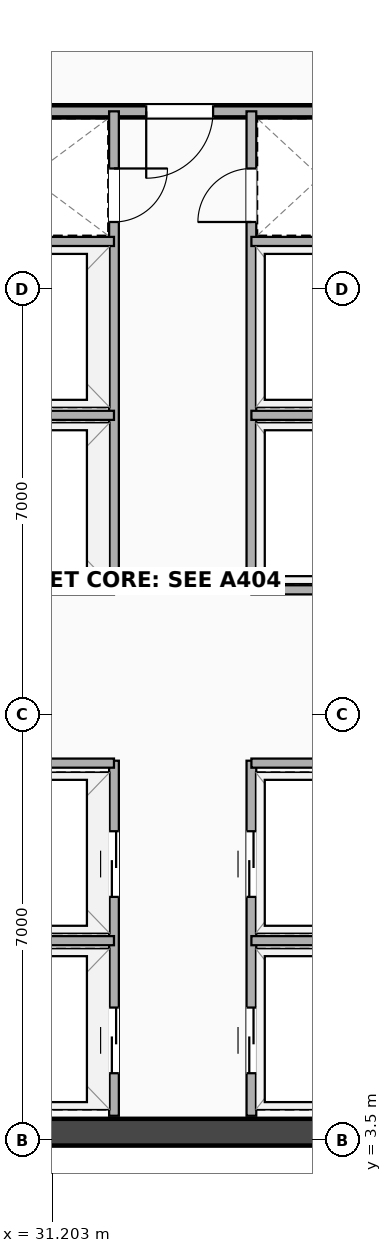
"""IFC4 building model, lengths in metres.
Left out: names, types, materials, properties, quantities, classifications, styles, units other than length and angle.
Written with IfcOpenShell. Run it as: python <this file> out.ifc"""

import sys

from ifc_helpers import new_model, si_unit, direction, frame, frame_2d, origin, place, context, subcontext, project, spatial, rectangle, extrude, element, fill, save


model = new_model("IFC4")
c1 = context("Model", 3, precision=1e-05, world=origin(), true_north=direction((0.0, 1.0)))
c2 = subcontext(c1, "Body", "Model", "MODEL_VIEW")
j1 = project(units=[si_unit("LENGTHUNIT", "METRE"), si_unit("PLANEANGLEUNIT", "RADIAN")], contexts=[c1])
p1 = place(None, origin())
s1 = spatial("IfcSite", under=j1, at=p1, CompositionType="ELEMENT")
p2 = place(p1, origin())
s2 = spatial("IfcBuilding", under=s1, at=p2, CompositionType="ELEMENT")
p3 = place(p2, frame((0.0, 0.0, 50.9)))
s3 = spatial("IfcBuildingStorey", under=s2, at=p3, CompositionType="ELEMENT", Elevation=50.9)
p4 = place(p3, frame((20.3, 3.63, 0.0), z_axis=(0.0, 0.0, 1.0), x_axis=(1.0, 0.0, 0.0)))
e1 = element("IfcWall", 1, at=p4, inside=s3, PredefinedType="SHEAR", context=c2, shape_type="SweptSolid", body=[
    extrude(rectangle(XDim=24.5, YDim=0.44, at=frame_2d((12.25, 0.0))), origin(), (0.0, 0.0, 1.0), 3.22),
])
p5 = place(p3, frame((29.2, 20.42, 0.0), z_axis=(0.0, 0.0, 1.0), x_axis=(1.0, 0.0, 0.0)))
e2 = element("IfcWall", 2, at=p5, inside=s3, PredefinedType="PARTITIONING", context=c2, shape_type="SweptSolid", body=[
    extrude(rectangle(XDim=7.8, YDim=0.2, at=frame_2d((3.9, 0.0))), origin(), (0.0, 0.0, 1.0), 2.51),
])
p6 = place(p5, frame((3.55, 0.0, 0.0)))
e3 = element("IfcOpeningElement", 3, at=p6, cuts=e2, PredefinedType="OPENING", context=c2, shape_type="SweptSolid", body=[
    extrude(rectangle(XDim=1.1, YDim=2.15, at=frame_2d((0.55, 1.075))), frame((0.0, 0.11, 0.0), z_axis=(0.0, -1.0, 0.0), x_axis=(1.0, 0.0, 0.0)), (0.0, 0.0, 1.0), 0.22),
])
p7 = place(p3, frame((32.22, 3.9, 0.0), z_axis=(0.0, 0.0, 1.0), x_axis=(0.0, 1.0, 0.0)))
e4 = element("IfcWall", 4, at=p7, inside=s3, PredefinedType="PARTITIONING", context=c2, shape_type="SweptSolid", body=[
    extrude(rectangle(XDim=5.84, YDim=0.16, at=frame_2d((2.92, 0.0))), origin(), (0.0, 0.0, 1.0), 3.22),
])
p8 = place(p7, frame((1.78, 0.0, 0.0), z_axis=(0.0, 0.0, 1.0), x_axis=(-1.0, 0.0, 0.0)))
e5 = element("IfcOpeningElement", 5, at=p8, cuts=e4, PredefinedType="OPENING", context=c2, shape_type="SweptSolid", body=[
    extrude(rectangle(XDim=1.08, YDim=2.16, at=frame_2d((0.54, 1.08))), frame((0.0, 0.09, 0.0), z_axis=(0.0, -1.0, 0.0), x_axis=(1.0, 0.0, 0.0)), (0.0, 0.0, 1.0), 0.18),
])
p9 = place(p7, frame((4.68, 0.0, 0.0), z_axis=(0.0, 0.0, 1.0), x_axis=(-1.0, 0.0, 0.0)))
e6 = element("IfcOpeningElement", 6, at=p9, cuts=e4, PredefinedType="OPENING", context=c2, shape_type="SweptSolid", body=[
    extrude(rectangle(XDim=1.08, YDim=2.16, at=frame_2d((0.54, 1.08))), frame((0.0, 0.09, 0.0), z_axis=(0.0, -1.0, 0.0), x_axis=(1.0, 0.0, 0.0)), (0.0, 0.0, 1.0), 0.18),
])
p10 = place(p3, frame((34.48, 3.9, 0.0), z_axis=(0.0, 0.0, 1.0), x_axis=(0.0, 1.0, 0.0)))
e7 = element("IfcWall", 7, at=p10, inside=s3, PredefinedType="PARTITIONING", context=c2, shape_type="SweptSolid", body=[
    extrude(rectangle(XDim=5.84, YDim=0.16, at=frame_2d((2.92, 0.0))), origin(), (0.0, 0.0, 1.0), 3.22),
])
p11 = place(p10, frame((0.7, 0.0, 0.0)))
e8 = element("IfcOpeningElement", 8, at=p11, cuts=e7, PredefinedType="OPENING", context=c2, shape_type="SweptSolid", body=[
    extrude(rectangle(XDim=1.08, YDim=2.16, at=frame_2d((0.54, 1.08))), frame((0.0, 0.09, 0.0), z_axis=(0.0, -1.0, 0.0), x_axis=(1.0, 0.0, 0.0)), (0.0, 0.0, 1.0), 0.18),
])
p12 = place(p10, frame((3.6, 0.0, 0.0)))
e9 = element("IfcOpeningElement", 9, at=p12, cuts=e7, PredefinedType="OPENING", context=c2, shape_type="SweptSolid", body=[
    extrude(rectangle(XDim=1.08, YDim=2.16, at=frame_2d((0.54, 1.08))), frame((0.0, 0.09, 0.0), z_axis=(0.0, -1.0, 0.0), x_axis=(1.0, 0.0, 0.0)), (0.0, 0.0, 1.0), 0.18),
])
p13 = place(p3, frame((29.45, 6.78, 0.0), z_axis=(0.0, 0.0, 1.0), x_axis=(1.0, 0.0, 0.0)))
e10 = element("IfcWall", 10, at=p13, inside=s3, PredefinedType="PARTITIONING", context=c2, shape_type="SweptSolid", body=[
    extrude(rectangle(XDim=2.77, YDim=0.15, at=frame_2d((1.385, 0.0))), origin(), (0.0, 0.0, 1.0), 3.22),
])
p14 = place(p3, frame((34.48, 6.78, 0.0), z_axis=(0.0, 0.0, 1.0), x_axis=(1.0, 0.0, 0.0)))
e11 = element("IfcWall", 11, at=p14, inside=s3, PredefinedType="PARTITIONING", context=c2, shape_type="SweptSolid", body=[
    extrude(rectangle(XDim=2.27, YDim=0.15, at=frame_2d((1.135, 0.0))), origin(), (0.0, 0.0, 1.0), 3.22),
])
p15 = place(p3, frame((29.45, 9.7, 0.0), z_axis=(0.0, 0.0, 1.0), x_axis=(1.0, 0.0, 0.0)))
e12 = element("IfcWall", 12, at=p15, inside=s3, PredefinedType="PARTITIONING", context=c2, shape_type="SweptSolid", body=[
    extrude(rectangle(XDim=2.77, YDim=0.15, at=frame_2d((1.385, 0.0))), origin(), (0.0, 0.0, 1.0), 3.22),
])
p16 = place(p3, frame((34.48, 9.7, 0.0), z_axis=(0.0, 0.0, 1.0), x_axis=(1.0, 0.0, 0.0)))
e13 = element("IfcWall", 13, at=p16, inside=s3, PredefinedType="PARTITIONING", context=c2, shape_type="SweptSolid", body=[
    extrude(rectangle(XDim=2.27, YDim=0.15, at=frame_2d((1.135, 0.0))), origin(), (0.0, 0.0, 1.0), 3.22),
])
p17 = place(p3, frame((32.22, 12.5, 0.0), z_axis=(0.0, 0.0, 1.0), x_axis=(0.0, 1.0, 0.0)))
e14 = element("IfcWall", 14, at=p17, inside=s3, PredefinedType="PARTITIONING", context=c2, shape_type="SweptSolid", body=[
    extrude(rectangle(XDim=7.92, YDim=0.16, at=frame_2d((3.96, 0.0))), origin(), (0.0, 0.0, 1.0), 2.51),
])
p18 = place(p17, frame((6.1, 0.0, 0.0)))
e15 = element("IfcOpeningElement", 15, at=p18, cuts=e14, PredefinedType="OPENING", context=c2, shape_type="SweptSolid", body=[
    extrude(rectangle(XDim=0.88, YDim=2.08, at=frame_2d((0.44, 1.04))), frame((0.0, 0.09, 0.0), z_axis=(0.0, -1.0, 0.0), x_axis=(1.0, 0.0, 0.0)), (0.0, 0.0, 1.0), 0.18),
])
p19 = place(p3, frame((34.48, 12.5, 0.0), z_axis=(0.0, 0.0, 1.0), x_axis=(0.0, 1.0, 0.0)))
e16 = element("IfcWall", 16, at=p19, inside=s3, PredefinedType="PARTITIONING", context=c2, shape_type="SweptSolid", body=[
    extrude(rectangle(XDim=7.92, YDim=0.16, at=frame_2d((3.96, 0.0))), origin(), (0.0, 0.0, 1.0), 2.51),
])
p20 = place(p19, frame((6.98, 0.0, 0.0), z_axis=(0.0, 0.0, 1.0), x_axis=(-1.0, 0.0, 0.0)))
e17 = element("IfcOpeningElement", 17, at=p20, cuts=e16, PredefinedType="OPENING", context=c2, shape_type="SweptSolid", body=[
    extrude(rectangle(XDim=0.88, YDim=2.08, at=frame_2d((0.44, 1.04))), frame((0.0, 0.09, 0.0), z_axis=(0.0, -1.0, 0.0), x_axis=(1.0, 0.0, 0.0)), (0.0, 0.0, 1.0), 0.18),
])
p21 = place(p3, frame((29.45, 12.55, 0.0), z_axis=(0.0, 0.0, 1.0), x_axis=(1.0, 0.0, 0.0)))
e18 = element("IfcWall", 18, at=p21, inside=s3, PredefinedType="PARTITIONING", context=c2, shape_type="SweptSolid", body=[
    extrude(rectangle(XDim=2.77, YDim=0.15, at=frame_2d((1.385, 0.0))), origin(), (0.0, 0.0, 1.0), 3.22),
])
p22 = place(p3, frame((34.48, 12.55, 0.0), z_axis=(0.0, 0.0, 1.0), x_axis=(1.0, 0.0, 0.0)))
e19 = element("IfcWall", 19, at=p22, inside=s3, PredefinedType="PARTITIONING", context=c2, shape_type="SweptSolid", body=[
    extrude(rectangle(XDim=2.27, YDim=0.15, at=frame_2d((1.135, 0.0))), origin(), (0.0, 0.0, 1.0), 3.22),
])
p23 = place(p3, frame((29.45, 15.42, 0.0), z_axis=(0.0, 0.0, 1.0), x_axis=(1.0, 0.0, 0.0)))
e20 = element("IfcWall", 20, at=p23, inside=s3, PredefinedType="PARTITIONING", context=c2, shape_type="SweptSolid", body=[
    extrude(rectangle(XDim=2.77, YDim=0.15, at=frame_2d((1.385, 0.0))), origin(), (0.0, 0.0, 1.0), 3.22),
])
p24 = place(p3, frame((34.48, 15.42, 0.0), z_axis=(0.0, 0.0, 1.0), x_axis=(1.0, 0.0, 0.0)))
e21 = element("IfcWall", 21, at=p24, inside=s3, PredefinedType="PARTITIONING", context=c2, shape_type="SweptSolid", body=[
    extrude(rectangle(XDim=2.27, YDim=0.15, at=frame_2d((1.135, 0.0))), origin(), (0.0, 0.0, 1.0), 3.22),
])
p25 = place(p3, frame((29.45, 18.28, 0.0), z_axis=(0.0, 0.0, 1.0), x_axis=(1.0, 0.0, 0.0)))
e22 = element("IfcWall", 22, at=p25, inside=s3, PredefinedType="PARTITIONING", context=c2, shape_type="SweptSolid", body=[
    extrude(rectangle(XDim=2.77, YDim=0.15, at=frame_2d((1.385, 0.0))), origin(), (0.0, 0.0, 1.0), 3.22),
])
p26 = place(p3, frame((34.48, 18.28, 0.0), z_axis=(0.0, 0.0, 1.0), x_axis=(1.0, 0.0, 0.0)))
e23 = element("IfcWall", 23, at=p26, inside=s3, PredefinedType="PARTITIONING", context=c2, shape_type="SweptSolid", body=[
    extrude(rectangle(XDim=2.27, YDim=0.15, at=frame_2d((1.135, 0.0))), origin(), (0.0, 0.0, 1.0), 3.22),
])
p27 = place(p6, origin())
e24 = element("IfcDoor", 24, at=p27, inside=s3, OperationType="SINGLE_SWING_LEFT", PredefinedType="DOOR", context=c2, shape_type="SweptSolid", body=[
    extrude(rectangle(XDim=1.1, YDim=2.15, at=frame_2d((0.55, 1.075))), frame((0.0, 0.025, 0.0), z_axis=(0.0, -1.0, 0.0), x_axis=(1.0, 0.0, 0.0)), (0.0, 0.0, 1.0), 0.05),
])
fill(e3, e24)
p28 = place(p8, origin())
e25 = element("IfcDoor", 25, at=p28, inside=s3, OperationType="DOUBLE_DOOR_SLIDING", PredefinedType="DOOR", context=c2, shape_type="SweptSolid", body=[
    extrude(rectangle(XDim=1.08, YDim=2.16, at=frame_2d((0.54, 1.08))), frame((0.0, 0.025, 0.0), z_axis=(0.0, -1.0, 0.0), x_axis=(1.0, 0.0, 0.0)), (0.0, 0.0, 1.0), 0.05),
])
fill(e5, e25)
p29 = place(p9, origin())
e26 = element("IfcDoor", 26, at=p29, inside=s3, OperationType="DOUBLE_DOOR_SLIDING", PredefinedType="DOOR", context=c2, shape_type="SweptSolid", body=[
    extrude(rectangle(XDim=1.08, YDim=2.16, at=frame_2d((0.54, 1.08))), frame((0.0, 0.025, 0.0), z_axis=(0.0, -1.0, 0.0), x_axis=(1.0, 0.0, 0.0)), (0.0, 0.0, 1.0), 0.05),
])
fill(e6, e26)
p30 = place(p11, origin())
e27 = element("IfcDoor", 27, at=p30, inside=s3, OperationType="DOUBLE_DOOR_SLIDING", PredefinedType="DOOR", context=c2, shape_type="SweptSolid", body=[
    extrude(rectangle(XDim=1.08, YDim=2.16, at=frame_2d((0.54, 1.08))), frame((0.0, 0.025, 0.0), z_axis=(0.0, -1.0, 0.0), x_axis=(1.0, 0.0, 0.0)), (0.0, 0.0, 1.0), 0.05),
])
fill(e8, e27)
p31 = place(p12, origin())
e28 = element("IfcDoor", 28, at=p31, inside=s3, OperationType="DOUBLE_DOOR_SLIDING", PredefinedType="DOOR", context=c2, shape_type="SweptSolid", body=[
    extrude(rectangle(XDim=1.08, YDim=2.16, at=frame_2d((0.54, 1.08))), frame((0.0, 0.025, 0.0), z_axis=(0.0, -1.0, 0.0), x_axis=(1.0, 0.0, 0.0)), (0.0, 0.0, 1.0), 0.05),
])
fill(e9, e28)
p32 = place(p18, origin())
e29 = element("IfcDoor", 29, at=p32, inside=s3, OperationType="SINGLE_SWING_RIGHT", PredefinedType="DOOR", context=c2, shape_type="SweptSolid", body=[
    extrude(rectangle(XDim=0.88, YDim=2.08, at=frame_2d((0.44, 1.04))), frame((0.0, 0.025, 0.0), z_axis=(0.0, -1.0, 0.0), x_axis=(1.0, 0.0, 0.0)), (0.0, 0.0, 1.0), 0.05),
])
fill(e15, e29)
p33 = place(p20, origin())
e30 = element("IfcDoor", 30, at=p33, inside=s3, OperationType="SINGLE_SWING_LEFT", PredefinedType="DOOR", context=c2, shape_type="SweptSolid", body=[
    extrude(rectangle(XDim=0.88, YDim=2.08, at=frame_2d((0.44, 1.04))), frame((0.0, 0.025, 0.0), z_axis=(0.0, -1.0, 0.0), x_axis=(1.0, 0.0, 0.0)), (0.0, 0.0, 1.0), 0.05),
])
fill(e17, e30)
save(model, sys.argv[1])
